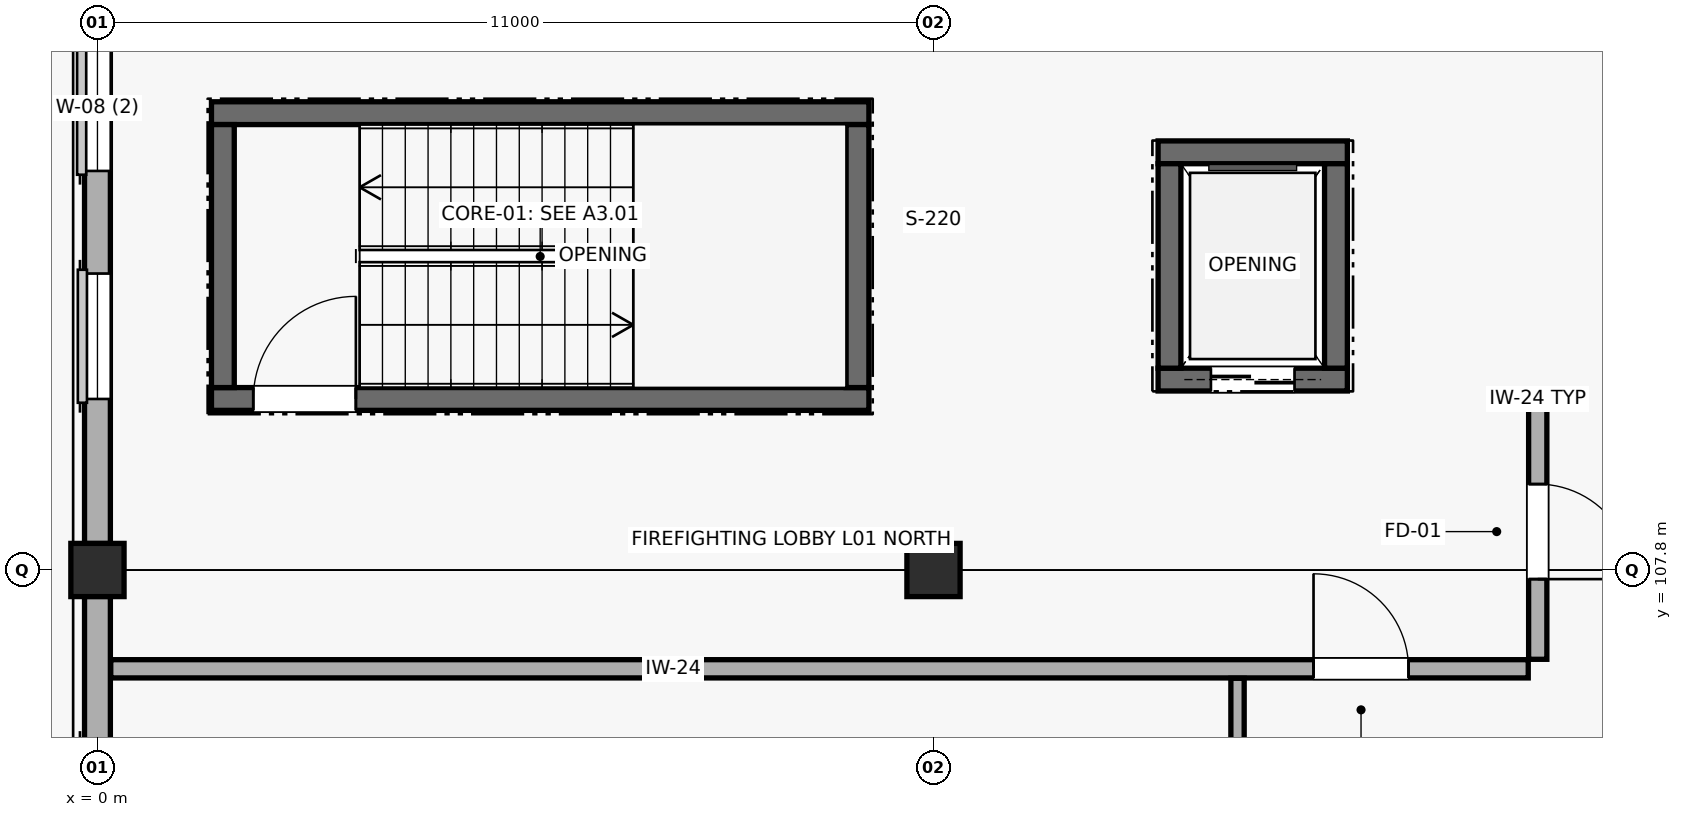
"""IFC4 building model, lengths in metres.
Left out: names, types, materials, properties, quantities, classifications, styles, units other than length and angle.
Written with IfcOpenShell. Run it as: python <this file> out.ifc"""

import sys

from ifc_helpers import new_model, si_unit, direction, frame, frame_2d, origin, origin_2d, place, context, subcontext, project, spatial, rectangle, extrude, element, fill, save


model = new_model("IFC4")
c1 = context("Model", 3, precision=1e-05, world=origin(), true_north=direction((0.0, 1.0)))
c2 = subcontext(c1, "Body", "Model", "MODEL_VIEW")
j1 = project(units=[si_unit("LENGTHUNIT", "METRE"), si_unit("PLANEANGLEUNIT", "RADIAN")], contexts=[c1])
p1 = place(None, origin())
s1 = spatial("IfcSite", under=j1, at=p1, CompositionType="ELEMENT")
p2 = place(p1, origin())
s2 = spatial("IfcBuilding", under=s1, at=p2, CompositionType="ELEMENT")
p3 = place(p2, frame((0.0, 0.0, 5.4)))
s3 = spatial("IfcBuildingStorey", under=s2, at=p3, CompositionType="ELEMENT", Elevation=5.4)
for number, where, z_axis, x_axis in (
    (1, (0.0, 107.8, 0.0), (0.0, 0.0, 1.0), (1.0, 0.0, 0.0)),
    (2, (11.0, 107.8, 0.0), (0.0, 0.0, 1.0), (1.0, 0.0, 0.0)),
):
    element("IfcColumn", number, at=place(p3, frame(where, z_axis=z_axis, x_axis=x_axis)), inside=s3, PredefinedType="COLUMN", context=c2, shape_type="SweptSolid", body=[
        extrude(rectangle(XDim=0.7, YDim=0.7, at=origin_2d()), origin(), (0.0, 0.0, 1.0), 4.5),
    ])
p4 = place(p3, frame((0.0, 107.452, 0.0), z_axis=(0.0, 0.0, 1.0), x_axis=(0.0, -1.0, 0.0)))
e3 = element("IfcWall", 3, at=p4, inside=s3, PredefinedType="SOLIDWALL", context=c2, shape_type="SweptSolid", body=[
    extrude(rectangle(XDim=8.504, YDim=0.34, at=frame_2d((4.252, 0.0))), origin(), (0.0, 0.0, 1.0), 3.725),
])
p5 = place(p4, frame((1.952, 0.0, 0.95)))
e4 = element("IfcOpeningElement", 4, at=p5, cuts=e3, PredefinedType="OPENING", context=c2, shape_type="SweptSolid", body=[
    extrude(rectangle(XDim=1.65, YDim=2.25, at=frame_2d((0.825, 1.125))), frame((0.0, 0.18, 0.0), z_axis=(0.0, -1.0, 0.0), x_axis=(1.0, 0.0, 0.0)), (0.0, 0.0, 1.0), 0.36),
])
p6 = place(p4, frame((4.952, 0.0, 0.95)))
e5 = element("IfcOpeningElement", 5, at=p6, cuts=e3, PredefinedType="OPENING", context=c2, shape_type="SweptSolid", body=[
    extrude(rectangle(XDim=1.65, YDim=2.25, at=frame_2d((0.825, 1.125))), frame((0.0, 0.18, 0.0), z_axis=(0.0, -1.0, 0.0), x_axis=(1.0, 0.0, 0.0)), (0.0, 0.0, 1.0), 0.36),
])
p7 = place(p3, frame((0.0, 116.652, 0.0), z_axis=(0.0, 0.0, 1.0), x_axis=(0.0, -1.0, 0.0)))
e6 = element("IfcWall", 6, at=p7, inside=s3, PredefinedType="SOLIDWALL", context=c2, shape_type="SweptSolid", body=[
    extrude(rectangle(XDim=8.504, YDim=0.34, at=frame_2d((4.252, 0.0))), origin(), (0.0, 0.0, 1.0), 3.725),
])
p8 = place(p7, frame((1.952, 0.0, 0.95)))
e7 = element("IfcOpeningElement", 7, at=p8, cuts=e6, PredefinedType="OPENING", context=c2, shape_type="SweptSolid", body=[
    extrude(rectangle(XDim=1.65, YDim=2.25, at=frame_2d((0.825, 1.125))), frame((0.0, 0.18, 0.0), z_axis=(0.0, -1.0, 0.0), x_axis=(1.0, 0.0, 0.0)), (0.0, 0.0, 1.0), 0.36),
])
p9 = place(p7, frame((4.952, 0.0, 0.95)))
e8 = element("IfcOpeningElement", 8, at=p9, cuts=e6, PredefinedType="OPENING", context=c2, shape_type="SweptSolid", body=[
    extrude(rectangle(XDim=1.65, YDim=2.25, at=frame_2d((0.825, 1.125))), frame((0.0, 0.18, 0.0), z_axis=(0.0, -1.0, 0.0), x_axis=(1.0, 0.0, 0.0)), (0.0, 0.0, 1.0), 0.36),
])
p10 = place(p3, frame((1.5, 110.05, 0.0), z_axis=(0.0, 0.0, 1.0), x_axis=(1.0, 0.0, 0.0)))
e9 = element("IfcWall", 9, at=p10, inside=s3, PredefinedType="SHEAR", context=c2, shape_type="SweptSolid", body=[
    extrude(rectangle(XDim=8.65, YDim=0.3, at=frame_2d((4.325, 0.0))), origin(), (0.0, 0.0, 1.0), 4.28),
])
p11 = place(p10, frame((0.55, 0.0, 0.0)))
e10 = element("IfcOpeningElement", 10, at=p11, cuts=e9, PredefinedType="OPENING", context=c2, shape_type="SweptSolid", body=[
    extrude(rectangle(XDim=1.35, YDim=2.2, at=frame_2d((0.675, 1.1))), frame((0.0, 0.16, 0.0), z_axis=(0.0, -1.0, 0.0), x_axis=(1.0, 0.0, 0.0)), (0.0, 0.0, 1.0), 0.32),
])
p12 = place(p3, frame((10.15, 113.81, 0.0), z_axis=(0.0, 0.0, 1.0), x_axis=(-1.0, 0.0, 0.0)))
e11 = element("IfcWall", 11, at=p12, inside=s3, PredefinedType="SHEAR", context=c2, shape_type="SweptSolid", body=[
    extrude(rectangle(XDim=8.65, YDim=0.3, at=frame_2d((4.325, 0.0))), origin(), (0.0, 0.0, 1.0), 4.28),
])
for number, where, z_axis, x_axis in (
    (12, (1.65, 113.66, 0.0), (0.0, 0.0, 1.0), (0.0, -1.0, 0.0)),
    (13, (10.0, 110.2, 0.0), (0.0, 0.0, 1.0), (0.0, 1.0, 0.0)),
):
    element("IfcWall", number, at=place(p3, frame(where, z_axis=z_axis, x_axis=x_axis)), inside=s3, PredefinedType="SHEAR", context=c2, shape_type="SweptSolid", body=[
        extrude(rectangle(XDim=3.46, YDim=0.3, at=frame_2d((1.73, 0.0))), origin(), (0.0, 0.0, 1.0), 4.28),
    ])
p13 = place(p3, frame((13.955, 110.305, 0.0), z_axis=(0.0, 0.0, 1.0), x_axis=(1.0, 0.0, 0.0)))
e14 = element("IfcWall", 14, at=p13, inside=s3, PredefinedType="SHEAR", context=c2, shape_type="SweptSolid", body=[
    extrude(rectangle(XDim=2.49, YDim=0.3, at=frame_2d((1.245, 0.0))), origin(), (0.0, 0.0, 1.0), 4.28),
])
p14 = place(p13, frame((0.695, 0.0, 0.0)))
e15 = element("IfcOpeningElement", 15, at=p14, cuts=e14, PredefinedType="OPENING", context=c2, shape_type="SweptSolid", body=[
    extrude(rectangle(XDim=1.1, YDim=2.15, at=frame_2d((0.55, 1.075))), frame((0.0, 0.16, 0.0), z_axis=(0.0, -1.0, 0.0), x_axis=(1.0, 0.0, 0.0)), (0.0, 0.0, 1.0), 0.32),
])
p15 = place(p3, frame((16.445, 113.295, 0.0), z_axis=(0.0, 0.0, 1.0), x_axis=(-1.0, 0.0, 0.0)))
e16 = element("IfcWall", 16, at=p15, inside=s3, PredefinedType="SHEAR", context=c2, shape_type="SweptSolid", body=[
    extrude(rectangle(XDim=2.49, YDim=0.3, at=frame_2d((1.245, 0.0))), origin(), (0.0, 0.0, 1.0), 4.28),
])
for number, where, z_axis, x_axis in (
    (17, (14.105, 113.145, 0.0), (0.0, 0.0, 1.0), (0.0, -1.0, 0.0)),
    (18, (16.295, 110.455, 0.0), (0.0, 0.0, 1.0), (0.0, 1.0, 0.0)),
):
    element("IfcWall", number, at=place(p3, frame(where, z_axis=z_axis, x_axis=x_axis)), inside=s3, PredefinedType="SHEAR", context=c2, shape_type="SweptSolid", body=[
        extrude(rectangle(XDim=2.69, YDim=0.3, at=frame_2d((1.345, 0.0))), origin(), (0.0, 0.0, 1.0), 4.28),
    ])
p16 = place(p3, frame((0.175, 106.5, 0.0), z_axis=(0.0, 0.0, 1.0), x_axis=(1.0, 0.0, 0.0)))
e19 = element("IfcWall", 19, at=p16, inside=s3, PredefinedType="PARTITIONING", context=c2, shape_type="SweptSolid", body=[
    extrude(rectangle(XDim=18.65, YDim=0.24, at=frame_2d((9.325, 0.0))), origin(), (0.0, 0.0, 1.0), 3.725),
])
p17 = place(p16, frame((15.825, 0.0, 0.0)))
e20 = element("IfcOpeningElement", 20, at=p17, cuts=e19, PredefinedType="OPENING", context=c2, shape_type="SweptSolid", body=[
    extrude(rectangle(XDim=1.25, YDim=2.2, at=frame_2d((0.625, 1.1))), frame((0.0, 0.13, 0.0), z_axis=(0.0, -1.0, 0.0), x_axis=(1.0, 0.0, 0.0)), (0.0, 0.0, 1.0), 0.26),
])
p18 = place(p3, frame((15.0, 80.625, 0.0), z_axis=(0.0, 0.0, 1.0), x_axis=(0.0, 1.0, 0.0)))
e21 = element("IfcWall", 21, at=p18, inside=s3, PredefinedType="PARTITIONING", context=c2, shape_type="SweptSolid", body=[
    extrude(rectangle(XDim=25.75, YDim=0.175, at=frame_2d((12.875, 0.0))), origin(), (0.0, 0.0, 1.0), 3.625),
])
p19 = place(p18, frame((8.505, 0.0, 0.0)))
e22 = element("IfcOpeningElement", 22, at=p19, cuts=e21, PredefinedType="OPENING", context=c2, shape_type="SweptSolid", body=[
    extrude(rectangle(XDim=1.05, YDim=2.2, at=frame_2d((0.525, 1.1))), frame((0.0, 0.097, 0.0), z_axis=(0.0, -1.0, 0.0), x_axis=(1.0, 0.0, 0.0)), (0.0, 0.0, 1.0), 0.195),
])
p20 = place(p3, frame((18.95, 106.625, 0.0), z_axis=(0.0, 0.0, 1.0), x_axis=(0.0, 1.0, 0.0)))
e23 = element("IfcWall", 23, at=p20, inside=s3, PredefinedType="PARTITIONING", context=c2, shape_type="SweptSolid", body=[
    extrude(rectangle(XDim=3.525, YDim=0.24, at=frame_2d((1.762, 0.0))), origin(), (0.0, 0.0, 1.0), 3.625),
])
p21 = place(p20, frame((1.055, 0.0, 0.0)))
e24 = element("IfcOpeningElement", 24, at=p21, cuts=e23, PredefinedType="OPENING", context=c2, shape_type="SweptSolid", body=[
    extrude(rectangle(XDim=1.25, YDim=2.2, at=frame_2d((0.625, 1.1))), frame((0.0, 0.13, 0.0), z_axis=(0.0, -1.0, 0.0), x_axis=(1.0, 0.0, 0.0)), (0.0, 0.0, 1.0), 0.26),
])
p22 = place(p8, origin())
e25 = element("IfcWindow", 25, at=p22, inside=s3, PartitioningType="SINGLE_PANEL", PredefinedType="WINDOW", context=c2, shape_type="SweptSolid", body=[
    extrude(rectangle(XDim=1.65, YDim=2.25, at=frame_2d((0.825, 1.125))), frame((0.0, 0.03, 0.0), z_axis=(0.0, -1.0, 0.0), x_axis=(1.0, 0.0, 0.0)), (0.0, 0.0, 1.0), 0.06),
])
fill(e7, e25)
p23 = place(p9, origin())
e26 = element("IfcWindow", 26, at=p23, inside=s3, PartitioningType="SINGLE_PANEL", PredefinedType="WINDOW", context=c2, shape_type="SweptSolid", body=[
    extrude(rectangle(XDim=1.65, YDim=2.25, at=frame_2d((0.825, 1.125))), frame((0.0, 0.03, 0.0), z_axis=(0.0, -1.0, 0.0), x_axis=(1.0, 0.0, 0.0)), (0.0, 0.0, 1.0), 0.06),
])
fill(e8, e26)
p24 = place(p11, origin())
e27 = element("IfcDoor", 27, at=p24, inside=s3, OperationType="SINGLE_SWING_RIGHT", PredefinedType="DOOR", context=c2, shape_type="SweptSolid", body=[
    extrude(rectangle(XDim=1.35, YDim=2.2, at=frame_2d((0.675, 1.1))), frame((0.0, 0.025, 0.0), z_axis=(0.0, -1.0, 0.0), x_axis=(1.0, 0.0, 0.0)), (0.0, 0.0, 1.0), 0.05),
])
fill(e10, e27)
p25 = place(p14, frame((1.1, 0.0, 0.0), z_axis=(0.0, 0.0, 1.0), x_axis=(-1.0, 0.0, 0.0)))
e28 = element("IfcDoor", 28, at=p25, inside=s3, OperationType="DOUBLE_DOOR_SLIDING", PredefinedType="DOOR", context=c2, shape_type="SweptSolid", body=[
    extrude(rectangle(XDim=1.1, YDim=2.15, at=frame_2d((0.55, 1.075))), frame((0.0, 0.025, 0.0), z_axis=(0.0, -1.0, 0.0), x_axis=(1.0, 0.0, 0.0)), (0.0, 0.0, 1.0), 0.05),
])
fill(e15, e28)
p26 = place(p17, origin())
e29 = element("IfcDoor", 29, at=p26, inside=s3, OperationType="SINGLE_SWING_LEFT", PredefinedType="DOOR", context=c2, shape_type="SweptSolid", body=[
    extrude(rectangle(XDim=1.25, YDim=2.2, at=frame_2d((0.625, 1.1))), frame((0.0, 0.025, 0.0), z_axis=(0.0, -1.0, 0.0), x_axis=(1.0, 0.0, 0.0)), (0.0, 0.0, 1.0), 0.05),
])
fill(e20, e29)
p27 = place(p21, frame((1.25, 0.0, 0.0), z_axis=(0.0, 0.0, 1.0), x_axis=(-1.0, 0.0, 0.0)))
e30 = element("IfcDoor", 30, at=p27, inside=s3, OperationType="SINGLE_SWING_RIGHT", PredefinedType="DOOR", context=c2, shape_type="SweptSolid", body=[
    extrude(rectangle(XDim=1.25, YDim=2.2, at=frame_2d((0.625, 1.1))), frame((0.0, 0.025, 0.0), z_axis=(0.0, -1.0, 0.0), x_axis=(1.0, 0.0, 0.0)), (0.0, 0.0, 1.0), 0.05),
])
fill(e24, e30)
save(model, sys.argv[1])
